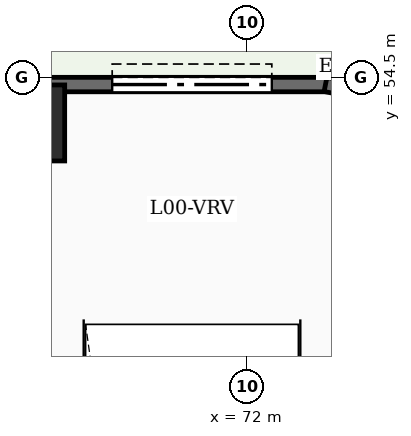
"""IFC4 building model, lengths in metres.
Left out: names, types, materials, properties, quantities, classifications, styles, units other than length and angle.
Written with IfcOpenShell. Run it as: python <this file> out.ifc"""

import sys

from ifc_helpers import new_model, si_unit, direction, frame, frame_2d, origin, origin_2d, place, context, subcontext, project, spatial, rectangle, circle, extrude, element, fill, save


model = new_model("IFC4")
c1 = context("Model", 3, precision=1e-05, world=origin(), true_north=direction((0.0, 1.0)))
c2 = subcontext(c1, "Body", "Model", "MODEL_VIEW")
j1 = project(units=[si_unit("LENGTHUNIT", "METRE"), si_unit("PLANEANGLEUNIT", "RADIAN")], contexts=[c1])
p1 = place(None, origin())
s1 = spatial("IfcSite", under=j1, at=p1, CompositionType="ELEMENT")
p2 = place(p1, origin())
s2 = spatial("IfcBuilding", under=s1, at=p2, CompositionType="ELEMENT")
p3 = place(p2, origin())
s3 = spatial("IfcBuildingStorey", under=s2, at=p3, CompositionType="ELEMENT", Elevation=0.0)
p4 = place(p3, frame((66.2, 53.3, -0.45), z_axis=(0.0, 0.0, 1.0), x_axis=(1.0, 0.0, 0.0)))
e1 = element("IfcColumn", 1, at=p4, inside=s3, PredefinedType="COLUMN", context=c2, shape_type="SweptSolid", body=[
    extrude(circle(Radius=1.0, at=origin_2d()), origin(), (0.0, 0.0, 1.0), 8.1),
])
p5 = place(p3, frame((74.063, 54.314, 0.0), z_axis=(0.0, 0.0, 1.0), x_axis=(0.9807762837, -0.195135546048, 0.0)))
e2 = element("IfcWall", 2, at=p5, inside=s3, PredefinedType="SOLIDWALL", context=c2, shape_type="SweptSolid", body=[
    extrude(rectangle(XDim=2.107, YDim=0.38, at=frame_2d((1.053, 0.0))), origin(), (0.0, 0.0, 1.0), 7.65),
])
p6 = place(p3, frame((5.4, 54.31, 0.0), z_axis=(0.0, 0.0, 1.0), x_axis=(1.0, 0.0, 0.0)))
e3 = element("IfcWall", 3, at=p6, inside=s3, PredefinedType="SOLIDWALL", context=c2, shape_type="SweptSolid", body=[
    extrude(rectangle(XDim=68.7, YDim=0.38, at=frame_2d((34.35, 0.0))), origin(), (0.0, 0.0, 1.0), 7.65),
])
p7 = place(p6, frame((63.05, 0.0, 0.0)))
e4 = element("IfcOpeningElement", 4, at=p7, cuts=e3, PredefinedType="OPENING", context=c2, shape_type="SweptSolid", body=[
    extrude(rectangle(XDim=4.2, YDim=3.2, at=frame_2d((2.1, 1.6))), frame((0.0, 0.2, 0.0), z_axis=(0.0, -1.0, 0.0), x_axis=(1.0, 0.0, 0.0)), (0.0, 0.0, 1.0), 0.4),
])
p8 = place(p6, frame((13.3, 0.0, 0.0)))
e5 = element("IfcOpeningElement", 5, at=p8, cuts=e3, PredefinedType="OPENING", context=c2, shape_type="SweptSolid", body=[
    extrude(rectangle(XDim=2.2, YDim=2.4, at=frame_2d((1.1, 1.2))), frame((0.0, 0.2, 0.0), z_axis=(0.0, -1.0, 0.0), x_axis=(1.0, 0.0, 0.0)), (0.0, 0.0, 1.0), 0.4),
])
p9 = place(p6, frame((25.5, 0.0, 0.0)))
e6 = element("IfcOpeningElement", 6, at=p9, cuts=e3, PredefinedType="OPENING", context=c2, shape_type="SweptSolid", body=[
    extrude(rectangle(XDim=2.2, YDim=2.4, at=frame_2d((1.1, 1.2))), frame((0.0, 0.2, 0.0), z_axis=(0.0, -1.0, 0.0), x_axis=(1.0, 0.0, 0.0)), (0.0, 0.0, 1.0), 0.4),
])
p10 = place(p6, frame((38.5, 0.0, 0.0)))
e7 = element("IfcOpeningElement", 7, at=p10, cuts=e3, PredefinedType="OPENING", context=c2, shape_type="SweptSolid", body=[
    extrude(rectangle(XDim=2.2, YDim=2.4, at=frame_2d((1.1, 1.2))), frame((0.0, 0.2, 0.0), z_axis=(0.0, -1.0, 0.0), x_axis=(1.0, 0.0, 0.0)), (0.0, 0.0, 1.0), 0.4),
])
p11 = place(p6, frame((48.5, 0.0, 0.0)))
e8 = element("IfcOpeningElement", 8, at=p11, cuts=e3, PredefinedType="OPENING", context=c2, shape_type="SweptSolid", body=[
    extrude(rectangle(XDim=2.2, YDim=2.4, at=frame_2d((1.1, 1.2))), frame((0.0, 0.2, 0.0), z_axis=(0.0, -1.0, 0.0), x_axis=(1.0, 0.0, 0.0)), (0.0, 0.0, 1.0), 0.4),
])
p12 = place(p6, frame((57.0, 0.0, 0.0)))
e9 = element("IfcOpeningElement", 9, at=p12, cuts=e3, PredefinedType="OPENING", context=c2, shape_type="SweptSolid", body=[
    extrude(rectangle(XDim=2.2, YDim=2.4, at=frame_2d((1.1, 1.2))), frame((0.0, 0.2, 0.0), z_axis=(0.0, -1.0, 0.0), x_axis=(1.0, 0.0, 0.0)), (0.0, 0.0, 1.0), 0.4),
])
p13 = place(p7, origin())
e10 = element("IfcDoor", 10, at=p13, inside=s3, OperationType="ROLLINGUP", PredefinedType="GATE", context=c2, shape_type="SweptSolid", body=[
    extrude(rectangle(XDim=4.2, YDim=3.2, at=frame_2d((2.1, 1.6))), frame((0.0, 0.025, 0.0), z_axis=(0.0, -1.0, 0.0), x_axis=(1.0, 0.0, 0.0)), (0.0, 0.0, 1.0), 0.05),
])
fill(e4, e10)
save(model, sys.argv[1])
